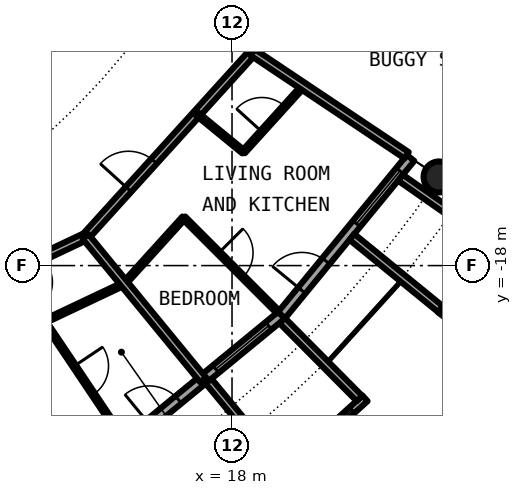
"""IFC4 building model, lengths in metres.
Left out: names, types, materials, properties, quantities, classifications, styles, units other than length and angle.
Written with IfcOpenShell. Run it as: python <this file> out.ifc"""

import sys

from ifc_helpers import new_model, si_unit, direction, frame, frame_2d, origin, origin_2d, place, context, subcontext, project, spatial, rectangle, circle, hollow_circle, extrude, element, fill, save


model = new_model("IFC4")
c1 = context("Model", 3, precision=1e-05, world=origin(), true_north=direction((0.0, 1.0)))
c2 = subcontext(c1, "Body", "Model", "MODEL_VIEW")
j1 = project(units=[si_unit("LENGTHUNIT", "METRE"), si_unit("PLANEANGLEUNIT", "RADIAN")], contexts=[c1])
p1 = place(None, origin())
s1 = spatial("IfcSite", under=j1, at=p1, CompositionType="ELEMENT")
p2 = place(p1, origin())
s2 = spatial("IfcBuilding", under=s1, at=p2, CompositionType="ELEMENT")
p3 = place(p2, frame((0.0, 0.0, 212.7)))
s3 = spatial("IfcBuildingStorey", under=s2, at=p3, CompositionType="ELEMENT", Elevation=212.7)
p4 = place(p3, frame((23.448, -15.667, 0.0), z_axis=(0.0, 0.0, 1.0), x_axis=(1.0, 0.0, 0.0)))
e1 = element("IfcColumn", 1, at=p4, inside=s3, PredefinedType="COLUMN", context=c2, shape_type="SweptSolid", body=[
    extrude(hollow_circle(Radius=0.406, WallThickness=0.03, at=origin_2d()), origin(), (0.0, 0.0, 1.0), 3.05),
])
p5 = place(p3, frame((15.167, -22.699, 0.0), z_axis=(0.0, 0.0, 1.0), x_axis=(0.773019449054, 0.634382322723, 0.0)))
e2 = element("IfcWall", 2, at=p5, inside=s3, PredefinedType="SOLIDWALL", context=c2, shape_type="SweptSolid", body=[
    extrude(rectangle(XDim=5.352, YDim=0.25, at=frame_2d((2.676, 0.0))), origin(), (0.0, 0.0, 1.0), 2.7),
])
p6 = place(p5, frame((0.841, 0.0, 0.0)))
e3 = element("IfcOpeningElement", 3, at=p6, cuts=e2, PredefinedType="OPENING", context=c2, shape_type="SweptSolid", body=[
    extrude(rectangle(XDim=1.0, YDim=2.2, at=frame_2d((0.5, 1.1))), frame((0.0, 0.135, 0.0), z_axis=(0.0, -1.0, 0.0), x_axis=(1.0, 0.0, 0.0)), (0.0, 0.0, 1.0), 0.27),
])
p7 = place(p5, frame((3.111, 0.0, 0.3)))
e4 = element("IfcOpeningElement", 4, at=p7, cuts=e2, PredefinedType="OPENING", context=c2, shape_type="SweptSolid", body=[
    extrude(rectangle(XDim=1.8, YDim=2.1, at=frame_2d((0.9, 1.05))), frame((0.0, 0.135, 0.0), z_axis=(0.0, -1.0, 0.0), x_axis=(1.0, 0.0, 0.0)), (0.0, 0.0, 1.0), 0.27),
])
p8 = place(p3, frame((19.282, -23.503, -0.03), z_axis=(0.0, 0.0, 1.0), x_axis=(0.740998365753, 0.671506829416, 0.0)))
e5 = element("IfcWall", 5, at=p8, inside=s3, PredefinedType="SOLIDWALL", context=c2, shape_type="SweptSolid", body=[
    extrude(rectangle(XDim=2.993, YDim=0.2, at=frame_2d((1.497, 0.0))), origin(), (0.0, 0.0, 1.0), 2.73),
])
p9 = place(p8, frame((0.457, 0.0, 0.33)))
e6 = element("IfcOpeningElement", 6, at=p9, cuts=e5, PredefinedType="OPENING", context=c2, shape_type="SweptSolid", body=[
    extrude(circle(Radius=1.04, at=frame_2d((1.04, 1.04))), frame((0.0, 0.11, 0.0), z_axis=(0.0, -1.0, 0.0), x_axis=(1.0, 0.0, 0.0)), (0.0, 0.0, 1.0), 0.22),
])
p10 = place(p3, frame((17.384, -21.041, -0.03), z_axis=(0.0, 0.0, 1.0), x_axis=(0.63709551667, -0.770784861449, 0.0)))
e7 = element("IfcWall", 7, at=p10, inside=s3, PredefinedType="SOLIDWALL", context=c2, shape_type="SweptSolid", body=[
    extrude(rectangle(XDim=3.006, YDim=0.2, at=frame_2d((1.503, 0.0))), origin(), (0.0, 0.0, 1.0), 2.73),
])
p11 = place(p3, frame((19.323, -19.45, -0.03), z_axis=(0.0, 0.0, 1.0), x_axis=(0.704476739375, -0.709727076896, 0.0)))
e8 = element("IfcWall", 8, at=p11, inside=s3, PredefinedType="SOLIDWALL", context=c2, shape_type="SweptSolid", body=[
    extrude(rectangle(XDim=2.883, YDim=0.2, at=frame_2d((1.441, 0.0))), origin(), (0.0, 0.0, 1.0), 2.73),
])
p12 = place(p3, frame((19.304, -19.304, 0.0), z_axis=(0.0, 0.0, 1.0), x_axis=(0.634382322723, 0.773019449054, 0.0)))
e9 = element("IfcWall", 9, at=p12, inside=s3, PredefinedType="SOLIDWALL", context=c2, shape_type="SweptSolid", body=[
    extrude(rectangle(XDim=5.352, YDim=0.25, at=frame_2d((2.676, 0.0))), origin(), (0.0, 0.0, 1.0), 2.7),
])
p13 = place(p12, frame((0.841, 0.0, 0.0)))
e10 = element("IfcOpeningElement", 10, at=p13, cuts=e9, PredefinedType="OPENING", context=c2, shape_type="SweptSolid", body=[
    extrude(rectangle(XDim=1.0, YDim=2.2, at=frame_2d((0.5, 1.1))), frame((0.0, 0.135, 0.0), z_axis=(0.0, -1.0, 0.0), x_axis=(1.0, 0.0, 0.0)), (0.0, 0.0, 1.0), 0.27),
])
p14 = place(p12, frame((3.111, 0.0, 0.3)))
e11 = element("IfcOpeningElement", 11, at=p14, cuts=e9, PredefinedType="OPENING", context=c2, shape_type="SweptSolid", body=[
    extrude(rectangle(XDim=1.8, YDim=2.1, at=frame_2d((0.9, 1.05))), frame((0.0, 0.135, 0.0), z_axis=(0.0, -1.0, 0.0), x_axis=(1.0, 0.0, 0.0)), (0.0, 0.0, 1.0), 0.27),
])
p15 = place(p3, frame((23.497, -19.289, -0.03), z_axis=(0.0, 0.0, 1.0), x_axis=(0.602806268067, 0.797887588059, 0.0)))
e12 = element("IfcWall", 12, at=p15, inside=s3, PredefinedType="SOLIDWALL", context=c2, shape_type="SweptSolid", body=[
    extrude(rectangle(XDim=2.447, YDim=0.2, at=frame_2d((1.223, 0.0))), origin(), (0.0, 0.0, 1.0), 2.73),
])
p16 = place(p15, frame((0.183, 0.0, 0.33)))
e13 = element("IfcOpeningElement", 13, at=p16, cuts=e12, PredefinedType="OPENING", context=c2, shape_type="SweptSolid", body=[
    extrude(circle(Radius=1.04, at=frame_2d((1.04, 1.04))), frame((0.0, 0.11, 0.0), z_axis=(0.0, -1.0, 0.0), x_axis=(1.0, 0.0, 0.0)), (0.0, 0.0, 1.0), 0.22),
])
p17 = place(p3, frame((21.155, -17.246, -0.03), z_axis=(0.0, 0.0, 1.0), x_axis=(0.775179004516, -0.631741648902, 0.0)))
e14 = element("IfcWall", 14, at=p17, inside=s3, PredefinedType="SOLIDWALL", context=c2, shape_type="SweptSolid", body=[
    extrude(rectangle(XDim=3.006, YDim=0.2, at=frame_2d((1.503, 0.0))), origin(), (0.0, 0.0, 1.0), 2.73),
])
p18 = place(p3, frame((22.433, -15.688, -0.03), z_axis=(0.0, 0.0, 1.0), x_axis=(0.819373043115, -0.573260687834, 0.0)))
e15 = element("IfcWall", 15, at=p18, inside=s3, PredefinedType="SOLIDWALL", context=c2, shape_type="SweptSolid", body=[
    extrude(rectangle(XDim=2.925, YDim=0.2, at=frame_2d((1.463, 0.0))), origin(), (0.0, 0.0, 1.0), 2.73),
])
p19 = place(p3, frame((15.162, -18.475, 0.0), z_axis=(0.0, 0.0, 1.0), x_axis=(0.671528384412, 0.740978831634, 0.0)))
e16 = element("IfcWall", 16, at=p19, inside=s3, PredefinedType="PARTITIONING", context=c2, shape_type="SweptSolid", body=[
    extrude(rectangle(XDim=2.338, YDim=0.1, at=frame_2d((1.169, 0.0))), origin(), (0.0, 0.0, 1.0), 2.7),
])
p20 = place(p3, frame((18.302, -15.01, 0.0), z_axis=(0.0, 0.0, 1.0), x_axis=(0.671637685376, 0.740879760544, 0.0)))
e17 = element("IfcWall", 17, at=p20, inside=s3, PredefinedType="PARTITIONING", context=c2, shape_type="SweptSolid", body=[
    extrude(rectangle(XDim=2.338, YDim=0.1, at=frame_2d((1.169, 0.0))), origin(), (0.0, 0.0, 1.0), 2.7),
])
p21 = place(p20, frame((0.719, 0.0, 0.0)))
e18 = element("IfcOpeningElement", 18, at=p21, cuts=e17, PredefinedType="OPENING", context=c2, shape_type="SweptSolid", body=[
    extrude(rectangle(XDim=0.9, YDim=2.3, at=frame_2d((0.45, 1.15))), frame((0.0, 0.06, 0.0), z_axis=(0.0, -1.0, 0.0), x_axis=(1.0, 0.0, 0.0)), (0.0, 0.0, 1.0), 0.12),
])
p22 = place(p3, frame((8.863, -21.455, 0.0), z_axis=(0.0, 0.0, 1.0), x_axis=(0.904027961542, 0.427473326361, 0.0)))
e19 = element("IfcWall", 19, at=p22, inside=s3, PredefinedType="PARTITIONING", context=c2, shape_type="SweptSolid", body=[
    extrude(rectangle(XDim=6.969, YDim=0.1, at=frame_2d((3.484, 0.0))), origin(), (0.0, 0.0, 1.0), 2.7),
])
p23 = place(p22, frame((3.034, 0.0, 0.0)))
e20 = element("IfcOpeningElement", 20, at=p23, cuts=e19, PredefinedType="OPENING", context=c2, shape_type="SweptSolid", body=[
    extrude(rectangle(XDim=0.9, YDim=2.3, at=frame_2d((0.45, 1.15))), frame((0.0, 0.06, 0.0), z_axis=(0.0, -1.0, 0.0), x_axis=(1.0, 0.0, 0.0)), (0.0, 0.0, 1.0), 0.12),
])
p24 = place(p3, frame((18.542, -12.389, 0.0), z_axis=(0.0, 0.0, 1.0), x_axis=(0.465359652486, 0.885121683068, 0.0)))
e21 = element("IfcWall", 21, at=p24, inside=s3, PredefinedType="PARTITIONING", context=c2, shape_type="SweptSolid", body=[
    extrude(rectangle(XDim=1.665, YDim=0.2, at=frame_2d((0.833, 0.0))), origin(), (0.0, 0.0, 1.0), 2.7),
])
p25 = place(p3, frame((14.147, -17.238, 0.0), z_axis=(0.0, 0.0, 1.0), x_axis=(0.671561669125, 0.740948665268, 0.0)))
e22 = element("IfcWall", 22, at=p25, inside=s3, PredefinedType="PARTITIONING", context=c2, shape_type="SweptSolid", body=[
    extrude(rectangle(XDim=6.544, YDim=0.2, at=frame_2d((3.272, 0.0))), origin(), (0.0, 0.0, 1.0), 2.7),
])
p26 = place(p25, frame((1.682, 0.0, 0.0)))
e23 = element("IfcOpeningElement", 23, at=p26, cuts=e22, PredefinedType="OPENING", context=c2, shape_type="SweptSolid", body=[
    extrude(rectangle(XDim=1.0, YDim=2.3, at=frame_2d((0.5, 1.15))), frame((0.0, 0.11, 0.0), z_axis=(0.0, -1.0, 0.0), x_axis=(1.0, 0.0, 0.0)), (0.0, 0.0, 1.0), 0.22),
])
p27 = place(p3, frame((4.352, -21.873, 0.0), z_axis=(0.0, 0.0, 1.0), x_axis=(0.903903349022, 0.427736759733, 0.0)))
e24 = element("IfcWall", 24, at=p27, inside=s3, PredefinedType="PARTITIONING", context=c2, shape_type="SweptSolid", body=[
    extrude(rectangle(XDim=10.838, YDim=0.2, at=frame_2d((5.419, 0.0))), origin(), (0.0, 0.0, 1.0), 2.7),
])
p28 = place(p27, frame((4.92, 0.0, 0.0)))
e25 = element("IfcOpeningElement", 25, at=p28, cuts=e24, PredefinedType="OPENING", context=c2, shape_type="SweptSolid", body=[
    extrude(rectangle(XDim=1.0, YDim=2.3, at=frame_2d((0.5, 1.15))), frame((0.0, 0.11, 0.0), z_axis=(0.0, -1.0, 0.0), x_axis=(1.0, 0.0, 0.0)), (0.0, 0.0, 1.0), 0.22),
])
p29 = place(p3, frame((6.773, -16.353, 0.0), z_axis=(0.0, 0.0, 1.0), x_axis=(0.773034536097, 0.634363938131, 0.0)))
e26 = element("IfcWall", 26, at=p29, inside=s3, PredefinedType="PARTITIONING", context=c2, shape_type="SweptSolid", body=[
    extrude(rectangle(XDim=10.277, YDim=0.2, at=frame_2d((5.138, 0.0))), origin(), (0.0, 0.0, 1.0), 2.7),
])
p30 = place(p29, frame((4.638, 0.0, 0.0)))
e27 = element("IfcOpeningElement", 27, at=p30, cuts=e26, PredefinedType="OPENING", context=c2, shape_type="SweptSolid", body=[
    extrude(rectangle(XDim=1.0, YDim=2.3, at=frame_2d((0.5, 1.15))), frame((0.0, 0.11, 0.0), z_axis=(0.0, -1.0, 0.0), x_axis=(1.0, 0.0, 0.0)), (0.0, 0.0, 1.0), 0.22),
])
p31 = place(p3, frame((17.077, -14.006, 0.0), z_axis=(0.0, 0.0, 1.0), x_axis=(0.773476341377, -0.633825172528, 0.0)))
e28 = element("IfcWall", 28, at=p31, inside=s3, PredefinedType="PARTITIONING", context=c2, shape_type="SweptSolid", body=[
    extrude(rectangle(XDim=1.584, YDim=0.1, at=frame_2d((0.792, 0.0))), origin(), (0.0, 0.0, 1.0), 2.7),
])
p32 = place(p3, frame((12.188, -18.165, 0.0), z_axis=(0.0, 0.0, 1.0), x_axis=(0.557206464517, -0.830373985564, 0.0)))
e29 = element("IfcWall", 29, at=p32, inside=s3, PredefinedType="PARTITIONING", context=c2, shape_type="SweptSolid", body=[
    extrude(rectangle(XDim=5.3, YDim=0.1, at=frame_2d((2.65, 0.0))), origin(), (0.0, 0.0, 1.0), 2.7),
])
p33 = place(p32, frame((0.334, 0.0, 0.0)))
e30 = element("IfcOpeningElement", 30, at=p33, cuts=e29, PredefinedType="OPENING", context=c2, shape_type="SweptSolid", body=[
    extrude(rectangle(XDim=0.9, YDim=2.3, at=frame_2d((0.45, 1.15))), frame((0.0, 0.06, 0.0), z_axis=(0.0, -1.0, 0.0), x_axis=(1.0, 0.0, 0.0)), (0.0, 0.0, 1.0), 0.12),
])
p34 = place(p32, frame((2.984, 0.0, 0.0)))
e31 = element("IfcOpeningElement", 31, at=p34, cuts=e29, PredefinedType="OPENING", context=c2, shape_type="SweptSolid", body=[
    extrude(rectangle(XDim=0.9, YDim=2.3, at=frame_2d((0.45, 1.15))), frame((0.0, 0.06, 0.0), z_axis=(0.0, -1.0, 0.0), x_axis=(1.0, 0.0, 0.0)), (0.0, 0.0, 1.0), 0.12),
])
p35 = place(p3, frame((14.147, -17.238, 0.0), z_axis=(0.0, 0.0, 1.0), x_axis=(0.634374159378, -0.773026148273, 0.0)))
e32 = element("IfcWall", 32, at=p35, inside=s3, PredefinedType="PARTITIONING", context=c2, shape_type="SweptSolid", body=[
    extrude(rectangle(XDim=4.876, YDim=0.2, at=frame_2d((2.438, 0.0))), origin(), (0.0, 0.0, 1.0), 2.7),
])
p36 = place(p3, frame((16.732, -16.743, 0.0), z_axis=(0.0, 0.0, 1.0), x_axis=(0.706967463531, -0.707246071398, 0.0)))
e33 = element("IfcWall", 33, at=p36, inside=s3, PredefinedType="PARTITIONING", context=c2, shape_type="SweptSolid", body=[
    extrude(rectangle(XDim=3.505, YDim=0.1, at=frame_2d((1.752, 0.0))), origin(), (0.0, 0.0, 1.0), 2.7),
])
p37 = place(p36, frame((1.303, 0.0, 0.0)))
e34 = element("IfcOpeningElement", 34, at=p37, cuts=e33, PredefinedType="OPENING", context=c2, shape_type="SweptSolid", body=[
    extrude(rectangle(XDim=0.9, YDim=2.3, at=frame_2d((0.45, 1.15))), frame((0.0, 0.06, 0.0), z_axis=(0.0, -1.0, 0.0), x_axis=(1.0, 0.0, 0.0)), (0.0, 0.0, 1.0), 0.12),
])
p38 = place(p3, frame((18.542, -12.389, 0.0), z_axis=(0.0, 0.0, 1.0), x_axis=(0.831387096605, -0.55569370664, 0.0)))
e35 = element("IfcWall", 35, at=p38, inside=s3, PredefinedType="PARTITIONING", context=c2, shape_type="SweptSolid", body=[
    extrude(rectangle(XDim=4.875, YDim=0.2, at=frame_2d((2.438, 0.0))), origin(), (0.0, 0.0, 1.0), 2.7),
])
p39 = place(p6, origin())
e36 = element("IfcDoor", 36, at=p39, inside=s3, OperationType="SINGLE_SWING_LEFT", PredefinedType="DOOR", context=c2, shape_type="SweptSolid", body=[
    extrude(rectangle(XDim=1.0, YDim=2.2, at=frame_2d((0.5, 1.1))), frame((0.0, 0.025, 0.0), z_axis=(0.0, -1.0, 0.0), x_axis=(1.0, 0.0, 0.0)), (0.0, 0.0, 1.0), 0.05),
])
fill(e3, e36)
p40 = place(p7, origin())
e37 = element("IfcWindow", 37, at=p40, inside=s3, PartitioningType="SINGLE_PANEL", PredefinedType="WINDOW", context=c2, shape_type="SweptSolid", body=[
    extrude(rectangle(XDim=1.8, YDim=2.1, at=frame_2d((0.9, 1.05))), frame((0.0, 0.03, 0.0), z_axis=(0.0, -1.0, 0.0), x_axis=(1.0, 0.0, 0.0)), (0.0, 0.0, 1.0), 0.06),
])
fill(e4, e37)
p41 = place(p9, origin())
e38 = element("IfcWindow", 38, at=p41, inside=s3, PartitioningType="SINGLE_PANEL", PredefinedType="WINDOW", context=c2, shape_type="SweptSolid", body=[
    extrude(circle(Radius=1.04, at=frame_2d((1.04, 1.04))), frame((0.0, 0.03, 0.0), z_axis=(0.0, -1.0, 0.0), x_axis=(1.0, 0.0, 0.0)), (0.0, 0.0, 1.0), 0.06),
])
fill(e6, e38)
p42 = place(p13, origin())
e39 = element("IfcDoor", 39, at=p42, inside=s3, OperationType="SINGLE_SWING_LEFT", PredefinedType="DOOR", context=c2, shape_type="SweptSolid", body=[
    extrude(rectangle(XDim=1.0, YDim=2.2, at=frame_2d((0.5, 1.1))), frame((0.0, 0.025, 0.0), z_axis=(0.0, -1.0, 0.0), x_axis=(1.0, 0.0, 0.0)), (0.0, 0.0, 1.0), 0.05),
])
fill(e10, e39)
p43 = place(p14, origin())
e40 = element("IfcWindow", 40, at=p43, inside=s3, PartitioningType="SINGLE_PANEL", PredefinedType="WINDOW", context=c2, shape_type="SweptSolid", body=[
    extrude(rectangle(XDim=1.8, YDim=2.1, at=frame_2d((0.9, 1.05))), frame((0.0, 0.03, 0.0), z_axis=(0.0, -1.0, 0.0), x_axis=(1.0, 0.0, 0.0)), (0.0, 0.0, 1.0), 0.06),
])
fill(e11, e40)
p44 = place(p34, origin())
e41 = element("IfcDoor", 41, at=p44, inside=s3, OperationType="SINGLE_SWING_RIGHT", PredefinedType="DOOR", context=c2, shape_type="SweptSolid", body=[
    extrude(rectangle(XDim=0.9, YDim=2.3, at=frame_2d((0.45, 1.15))), frame((0.0, 0.025, 0.0), z_axis=(0.0, -1.0, 0.0), x_axis=(1.0, 0.0, 0.0)), (0.0, 0.0, 1.0), 0.05),
])
fill(e31, e41)
p45 = place(p26, origin())
e42 = element("IfcDoor", 42, at=p45, inside=s3, OperationType="SINGLE_SWING_LEFT", PredefinedType="DOOR", context=c2, shape_type="SweptSolid", body=[
    extrude(rectangle(XDim=1.0, YDim=2.3, at=frame_2d((0.5, 1.15))), frame((0.0, 0.025, 0.0), z_axis=(0.0, -1.0, 0.0), x_axis=(1.0, 0.0, 0.0)), (0.0, 0.0, 1.0), 0.05),
])
fill(e23, e42)
p46 = place(p21, origin())
e43 = element("IfcDoor", 43, at=p46, inside=s3, OperationType="SINGLE_SWING_LEFT", PredefinedType="DOOR", context=c2, shape_type="SweptSolid", body=[
    extrude(rectangle(XDim=0.9, YDim=2.3, at=frame_2d((0.45, 1.15))), frame((0.0, 0.025, 0.0), z_axis=(0.0, -1.0, 0.0), x_axis=(1.0, 0.0, 0.0)), (0.0, 0.0, 1.0), 0.05),
])
fill(e18, e43)
p47 = place(p37, origin())
e44 = element("IfcDoor", 44, at=p47, inside=s3, OperationType="SINGLE_SWING_LEFT", PredefinedType="DOOR", context=c2, shape_type="SweptSolid", body=[
    extrude(rectangle(XDim=0.9, YDim=2.3, at=frame_2d((0.45, 1.15))), frame((0.0, 0.025, 0.0), z_axis=(0.0, -1.0, 0.0), x_axis=(1.0, 0.0, 0.0)), (0.0, 0.0, 1.0), 0.05),
])
fill(e34, e44)
save(model, sys.argv[1])
